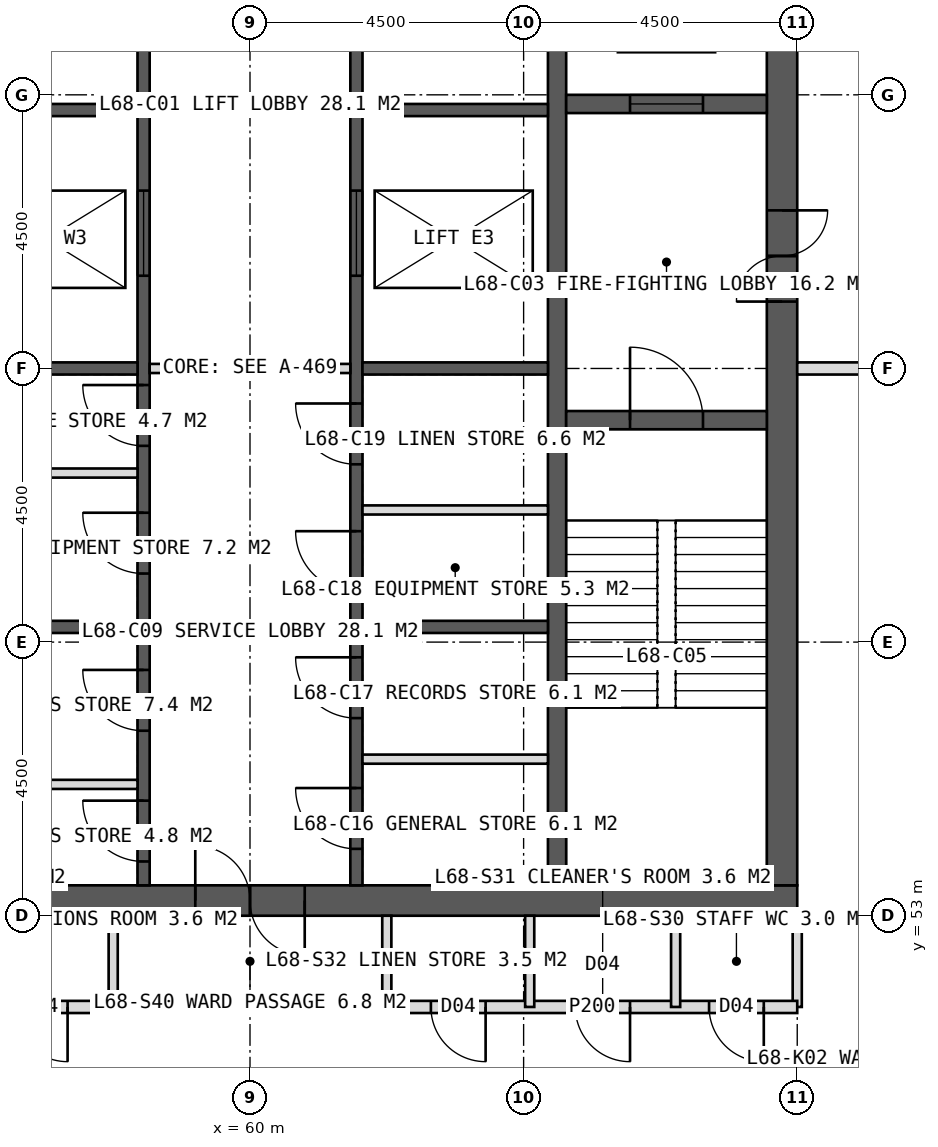
"""IFC4 building model, lengths in metres.
Left out: names, types, materials, properties, quantities, classifications, styles, units other than length and angle.
Written with IfcOpenShell. Run it as: python <this file> out.ifc"""

import sys

from ifc_helpers import new_model, si_unit, direction, frame, frame_2d, origin, place, context, subcontext, project, spatial, rectangle, extrude, element, fill, save


model = new_model("IFC4")
c1 = context("Model", 3, precision=1e-05, world=origin(), true_north=direction((0.0, 1.0)))
c2 = subcontext(c1, "Body", "Model", "MODEL_VIEW")
j1 = project(units=[si_unit("LENGTHUNIT", "METRE"), si_unit("PLANEANGLEUNIT", "RADIAN")], contexts=[c1])
p1 = place(None, origin())
s1 = spatial("IfcSite", under=j1, at=p1, CompositionType="ELEMENT")
p2 = place(p1, origin())
s2 = spatial("IfcBuilding", under=s1, at=p2, CompositionType="ELEMENT")
p3 = place(p2, frame((0.0, 0.0, 282.0)))
s3 = spatial("IfcBuildingStorey", under=s2, at=p3, CompositionType="ELEMENT", Elevation=282.0)
p4 = place(p3, frame((51.0, 53.25, 0.0), z_axis=(0.0, 0.0, 1.0), x_axis=(1.0, 0.0, 0.0)))
e1 = element("IfcWall", 1, at=p4, inside=s3, PredefinedType="SHEAR", context=c2, shape_type="SweptSolid", body=[
    extrude(rectangle(XDim=18.0, YDim=0.5, at=frame_2d((9.0, 0.0))), origin(), (0.0, 0.0, 1.0), 4.0),
])
p5 = place(p4, frame((8.1, 0.0, 0.0)))
e2 = element("IfcOpeningElement", 2, at=p5, cuts=e1, PredefinedType="OPENING", context=c2, shape_type="SweptSolid", body=[
    extrude(rectangle(XDim=1.8, YDim=2.2, at=frame_2d((0.9, 1.1))), frame((0.0, 0.26, 0.0), z_axis=(0.0, -1.0, 0.0), x_axis=(1.0, 0.0, 0.0)), (0.0, 0.0, 1.0), 0.52),
])
p6 = place(p3, frame((68.75, 53.5, 0.0), z_axis=(0.0, 0.0, 1.0), x_axis=(0.0, 1.0, 0.0)))
e3 = element("IfcWall", 3, at=p6, inside=s3, PredefinedType="SHEAR", context=c2, shape_type="SweptSolid", body=[
    extrude(rectangle(XDim=17.0, YDim=0.5, at=frame_2d((8.5, 0.0))), origin(), (0.0, 0.0, 1.0), 4.0),
])
p7 = place(p6, frame((9.6, 0.0, 0.0)))
e4 = element("IfcOpeningElement", 4, at=p7, cuts=e3, PredefinedType="OPENING", context=c2, shape_type="SweptSolid", body=[
    extrude(rectangle(XDim=1.5, YDim=2.2, at=frame_2d((0.75, 1.1))), frame((0.0, 0.26, 0.0), z_axis=(0.0, -1.0, 0.0), x_axis=(1.0, 0.0, 0.0)), (0.0, 0.0, 1.0), 0.52),
])
p8 = place(p3, frame((65.05, 53.5, 0.0), z_axis=(0.0, 0.0, 1.0), x_axis=(0.0, 1.0, 0.0)))
e5 = element("IfcWall", 5, at=p8, inside=s3, PredefinedType="SHEAR", context=c2, shape_type="SweptSolid", body=[
    extrude(rectangle(XDim=17.0, YDim=0.3, at=frame_2d((8.5, 0.0))), origin(), (0.0, 0.0, 1.0), 4.0),
])
p9 = place(p3, frame((58.25, 53.5, 0.0), z_axis=(0.0, 0.0, 1.0), x_axis=(0.0, 1.0, 0.0)))
e6 = element("IfcWall", 6, at=p9, inside=s3, PredefinedType="SHEAR", context=c2, shape_type="SweptSolid", body=[
    extrude(rectangle(XDim=17.0, YDim=0.2, at=frame_2d((8.5, 0.0))), origin(), (0.0, 0.0, 1.0), 4.0),
])
p10 = place(p9, frame((0.393, 0.0, 0.0)))
e7 = element("IfcOpeningElement", 7, at=p10, cuts=e6, PredefinedType="OPENING", context=c2, shape_type="SweptSolid", body=[
    extrude(rectangle(XDim=1.0, YDim=2.1, at=frame_2d((0.5, 1.05))), frame((0.0, 0.11, 0.0), z_axis=(0.0, -1.0, 0.0), x_axis=(1.0, 0.0, 0.0)), (0.0, 0.0, 1.0), 0.22),
])
p11 = place(p9, frame((2.542, 0.0, 0.0)))
e8 = element("IfcOpeningElement", 8, at=p11, cuts=e6, PredefinedType="OPENING", context=c2, shape_type="SweptSolid", body=[
    extrude(rectangle(XDim=1.0, YDim=2.1, at=frame_2d((0.5, 1.05))), frame((0.0, 0.11, 0.0), z_axis=(0.0, -1.0, 0.0), x_axis=(1.0, 0.0, 0.0)), (0.0, 0.0, 1.0), 0.22),
])
p12 = place(p9, frame((5.127, 0.0, 0.0)))
e9 = element("IfcOpeningElement", 9, at=p12, cuts=e6, PredefinedType="OPENING", context=c2, shape_type="SweptSolid", body=[
    extrude(rectangle(XDim=1.0, YDim=2.1, at=frame_2d((0.5, 1.05))), frame((0.0, 0.11, 0.0), z_axis=(0.0, -1.0, 0.0), x_axis=(1.0, 0.0, 0.0)), (0.0, 0.0, 1.0), 0.22),
])
p13 = place(p9, frame((7.228, 0.0, 0.0)))
e10 = element("IfcOpeningElement", 10, at=p13, cuts=e6, PredefinedType="OPENING", context=c2, shape_type="SweptSolid", body=[
    extrude(rectangle(XDim=1.0, YDim=2.1, at=frame_2d((0.5, 1.05))), frame((0.0, 0.11, 0.0), z_axis=(0.0, -1.0, 0.0), x_axis=(1.0, 0.0, 0.0)), (0.0, 0.0, 1.0), 0.22),
])
p14 = place(p9, frame((10.025, 0.0, 0.0)))
e11 = element("IfcOpeningElement", 11, at=p14, cuts=e6, PredefinedType="OPENING", context=c2, shape_type="SweptSolid", body=[
    extrude(rectangle(XDim=1.4, YDim=2.2, at=frame_2d((0.7, 1.1))), frame((0.0, 0.11, 0.0), z_axis=(0.0, -1.0, 0.0), x_axis=(1.0, 0.0, 0.0)), (0.0, 0.0, 1.0), 0.22),
])
p15 = place(p9, frame((14.325, 0.0, 0.0)))
e12 = element("IfcOpeningElement", 12, at=p15, cuts=e6, PredefinedType="OPENING", context=c2, shape_type="SweptSolid", body=[
    extrude(rectangle(XDim=1.4, YDim=2.2, at=frame_2d((0.7, 1.1))), frame((0.0, 0.11, 0.0), z_axis=(0.0, -1.0, 0.0), x_axis=(1.0, 0.0, 0.0)), (0.0, 0.0, 1.0), 0.22),
])
p16 = place(p3, frame((61.75, 53.5, 0.0), z_axis=(0.0, 0.0, 1.0), x_axis=(0.0, 1.0, 0.0)))
e13 = element("IfcWall", 13, at=p16, inside=s3, PredefinedType="SHEAR", context=c2, shape_type="SweptSolid", body=[
    extrude(rectangle(XDim=17.0, YDim=0.2, at=frame_2d((8.5, 0.0))), origin(), (0.0, 0.0, 1.0), 4.0),
])
p17 = place(p16, frame((0.6, 0.0, 0.0)))
e14 = element("IfcOpeningElement", 14, at=p17, cuts=e13, PredefinedType="OPENING", context=c2, shape_type="SweptSolid", body=[
    extrude(rectangle(XDim=1.0, YDim=2.1, at=frame_2d((0.5, 1.05))), frame((0.0, 0.11, 0.0), z_axis=(0.0, -1.0, 0.0), x_axis=(1.0, 0.0, 0.0)), (0.0, 0.0, 1.0), 0.22),
])
p18 = place(p16, frame((2.75, 0.0, 0.0)))
e15 = element("IfcOpeningElement", 15, at=p18, cuts=e13, PredefinedType="OPENING", context=c2, shape_type="SweptSolid", body=[
    extrude(rectangle(XDim=1.0, YDim=2.1, at=frame_2d((0.5, 1.05))), frame((0.0, 0.11, 0.0), z_axis=(0.0, -1.0, 0.0), x_axis=(1.0, 0.0, 0.0)), (0.0, 0.0, 1.0), 0.22),
])
p19 = place(p16, frame((4.824, 0.0, 0.0)))
e16 = element("IfcOpeningElement", 16, at=p19, cuts=e13, PredefinedType="OPENING", context=c2, shape_type="SweptSolid", body=[
    extrude(rectangle(XDim=1.0, YDim=2.1, at=frame_2d((0.5, 1.05))), frame((0.0, 0.11, 0.0), z_axis=(0.0, -1.0, 0.0), x_axis=(1.0, 0.0, 0.0)), (0.0, 0.0, 1.0), 0.22),
])
p20 = place(p16, frame((6.924, 0.0, 0.0)))
e17 = element("IfcOpeningElement", 17, at=p20, cuts=e13, PredefinedType="OPENING", context=c2, shape_type="SweptSolid", body=[
    extrude(rectangle(XDim=1.0, YDim=2.1, at=frame_2d((0.5, 1.05))), frame((0.0, 0.11, 0.0), z_axis=(0.0, -1.0, 0.0), x_axis=(1.0, 0.0, 0.0)), (0.0, 0.0, 1.0), 0.22),
])
p21 = place(p16, frame((10.025, 0.0, 0.0)))
e18 = element("IfcOpeningElement", 18, at=p21, cuts=e13, PredefinedType="OPENING", context=c2, shape_type="SweptSolid", body=[
    extrude(rectangle(XDim=1.4, YDim=2.2, at=frame_2d((0.7, 1.1))), frame((0.0, 0.11, 0.0), z_axis=(0.0, -1.0, 0.0), x_axis=(1.0, 0.0, 0.0)), (0.0, 0.0, 1.0), 0.22),
])
p22 = place(p16, frame((14.325, 0.0, 0.0)))
e19 = element("IfcOpeningElement", 19, at=p22, cuts=e13, PredefinedType="OPENING", context=c2, shape_type="SweptSolid", body=[
    extrude(rectangle(XDim=1.4, YDim=2.2, at=frame_2d((0.7, 1.1))), frame((0.0, 0.11, 0.0), z_axis=(0.0, -1.0, 0.0), x_axis=(1.0, 0.0, 0.0)), (0.0, 0.0, 1.0), 0.22),
])
for number, where, z_axis, x_axis in (
    (20, (55.1, 57.75, 0.0), (0.0, 0.0, 1.0), (1.0, 0.0, 0.0)),
    (21, (61.85, 57.75, 0.0), (0.0, 0.0, 1.0), (1.0, 0.0, 0.0)),
    (22, (55.1, 62.0, 0.0), (0.0, 0.0, 1.0), (1.0, 0.0, 0.0)),
    (23, (61.85, 62.0, 0.0), (0.0, 0.0, 1.0), (1.0, 0.0, 0.0)),
    (24, (55.1, 66.25, 0.0), (0.0, 0.0, 1.0), (1.0, 0.0, 0.0)),
    (25, (61.85, 66.25, 0.0), (0.0, 0.0, 1.0), (1.0, 0.0, 0.0)),
):
    element("IfcWall", number, at=place(p3, frame(where, z_axis=z_axis, x_axis=x_axis)), inside=s3, PredefinedType="SHEAR", context=c2, shape_type="SweptSolid", body=[
        extrude(rectangle(XDim=3.05, YDim=0.2, at=frame_2d((1.525, 0.0))), origin(), (0.0, 0.0, 1.0), 4.0),
    ])
p23 = place(p3, frame((65.2, 61.15, 0.0), z_axis=(0.0, 0.0, 1.0), x_axis=(1.0, 0.0, 0.0)))
e26 = element("IfcWall", 26, at=p23, inside=s3, PredefinedType="SHEAR", context=c2, shape_type="SweptSolid", body=[
    extrude(rectangle(XDim=3.3, YDim=0.3, at=frame_2d((1.65, 0.0))), origin(), (0.0, 0.0, 1.0), 4.0),
])
p24 = place(p23, frame((1.05, 0.0, 0.0)))
e27 = element("IfcOpeningElement", 27, at=p24, cuts=e26, PredefinedType="OPENING", context=c2, shape_type="SweptSolid", body=[
    extrude(rectangle(XDim=1.2, YDim=2.1, at=frame_2d((0.6, 1.05))), frame((0.0, 0.16, 0.0), z_axis=(0.0, -1.0, 0.0), x_axis=(1.0, 0.0, 0.0)), (0.0, 0.0, 1.0), 0.32),
])
p25 = place(p3, frame((65.2, 66.35, 0.0), z_axis=(0.0, 0.0, 1.0), x_axis=(1.0, 0.0, 0.0)))
e28 = element("IfcWall", 28, at=p25, inside=s3, PredefinedType="SHEAR", context=c2, shape_type="SweptSolid", body=[
    extrude(rectangle(XDim=3.3, YDim=0.3, at=frame_2d((1.65, 0.0))), origin(), (0.0, 0.0, 1.0), 4.0),
])
p26 = place(p25, frame((1.05, 0.0, 0.0)))
e29 = element("IfcOpeningElement", 29, at=p26, cuts=e28, PredefinedType="OPENING", context=c2, shape_type="SweptSolid", body=[
    extrude(rectangle(XDim=1.2, YDim=2.2, at=frame_2d((0.6, 1.1))), frame((0.0, 0.16, 0.0), z_axis=(0.0, -1.0, 0.0), x_axis=(1.0, 0.0, 0.0)), (0.0, 0.0, 1.0), 0.32),
])
p27 = place(p3, frame((69.0, 53.0, 0.0), z_axis=(0.0, 0.0, 1.0), x_axis=(0.0, -1.0, 0.0)))
e30 = element("IfcWall", 30, at=p27, inside=s3, PredefinedType="PARTITIONING", context=c2, shape_type="SweptSolid", body=[
    extrude(rectangle(XDim=1.5, YDim=0.15, at=frame_2d((0.75, 0.0))), origin(), (0.0, 0.0, 1.0), 3.75),
])
p28 = place(p3, frame((69.0, 51.5, 0.0), z_axis=(0.0, 0.0, 1.0), x_axis=(-1.0, 0.0, 0.0)))
e31 = element("IfcWall", 31, at=p28, inside=s3, PredefinedType="PARTITIONING", context=c2, shape_type="SweptSolid", body=[
    extrude(rectangle(XDim=6.75, YDim=0.2, at=frame_2d((3.375, 0.0))), origin(), (0.0, 0.0, 1.0), 3.75),
])
p29 = place(p28, frame((0.55, 0.0, 0.0)))
e32 = element("IfcOpeningElement", 32, at=p29, cuts=e31, PredefinedType="OPENING", context=c2, shape_type="SweptSolid", body=[
    extrude(rectangle(XDim=0.9, YDim=2.1, at=frame_2d((0.45, 1.05))), frame((0.0, 0.11, 0.0), z_axis=(0.0, -1.0, 0.0), x_axis=(1.0, 0.0, 0.0)), (0.0, 0.0, 1.0), 0.22),
])
p30 = place(p28, frame((2.75, 0.0, 0.0)))
e33 = element("IfcOpeningElement", 33, at=p30, cuts=e31, PredefinedType="OPENING", context=c2, shape_type="SweptSolid", body=[
    extrude(rectangle(XDim=0.9, YDim=2.1, at=frame_2d((0.45, 1.05))), frame((0.0, 0.11, 0.0), z_axis=(0.0, -1.0, 0.0), x_axis=(1.0, 0.0, 0.0)), (0.0, 0.0, 1.0), 0.22),
])
p31 = place(p28, frame((5.125, 0.0, 0.0)))
e34 = element("IfcOpeningElement", 34, at=p31, cuts=e31, PredefinedType="OPENING", context=c2, shape_type="SweptSolid", body=[
    extrude(rectangle(XDim=0.9, YDim=2.1, at=frame_2d((0.45, 1.05))), frame((0.0, 0.11, 0.0), z_axis=(0.0, -1.0, 0.0), x_axis=(1.0, 0.0, 0.0)), (0.0, 0.0, 1.0), 0.22),
])
p32 = place(p3, frame((57.75, 51.5, 0.0), z_axis=(0.0, 0.0, 1.0), x_axis=(-1.0, 0.0, 0.0)))
e35 = element("IfcWall", 35, at=p32, inside=s3, PredefinedType="PARTITIONING", context=c2, shape_type="SweptSolid", body=[
    extrude(rectangle(XDim=8.25, YDim=0.2, at=frame_2d((4.125, 0.0))), origin(), (0.0, 0.0, 1.0), 3.75),
])
p33 = place(p32, frame((0.75, 0.0, 0.0)))
e36 = element("IfcOpeningElement", 36, at=p33, cuts=e35, PredefinedType="OPENING", context=c2, shape_type="SweptSolid", body=[
    extrude(rectangle(XDim=0.9, YDim=2.1, at=frame_2d((0.45, 1.05))), frame((0.0, 0.11, 0.0), z_axis=(0.0, -1.0, 0.0), x_axis=(1.0, 0.0, 0.0)), (0.0, 0.0, 1.0), 0.22),
])
p34 = place(p32, frame((3.2, 0.0, 0.0)))
e37 = element("IfcOpeningElement", 37, at=p34, cuts=e35, PredefinedType="OPENING", context=c2, shape_type="SweptSolid", body=[
    extrude(rectangle(XDim=0.9, YDim=2.1, at=frame_2d((0.45, 1.05))), frame((0.0, 0.11, 0.0), z_axis=(0.0, -1.0, 0.0), x_axis=(1.0, 0.0, 0.0)), (0.0, 0.0, 1.0), 0.22),
])
p35 = place(p32, frame((6.075, 0.0, 0.0)))
e38 = element("IfcOpeningElement", 38, at=p35, cuts=e35, PredefinedType="OPENING", context=c2, shape_type="SweptSolid", body=[
    extrude(rectangle(XDim=1.0, YDim=2.1, at=frame_2d((0.5, 1.05))), frame((0.0, 0.11, 0.0), z_axis=(0.0, -1.0, 0.0), x_axis=(1.0, 0.0, 0.0)), (0.0, 0.0, 1.0), 0.22),
])
for number, where, z_axis, x_axis in (
    (39, (62.25, 53.0, 0.0), (0.0, 0.0, 1.0), (0.0, -1.0, 0.0)),
    (40, (57.75, 53.0, 0.0), (0.0, 0.0, 1.0), (0.0, -1.0, 0.0)),
    (41, (67.0, 53.0, 0.0), (0.0, 0.0, 1.0), (0.0, -1.0, 0.0)),
):
    element("IfcWall", number, at=place(p3, frame(where, z_axis=z_axis, x_axis=x_axis)), inside=s3, PredefinedType="PARTITIONING", context=c2, shape_type="SweptSolid", body=[
        extrude(rectangle(XDim=1.5, YDim=0.15, at=frame_2d((0.75, 0.0))), origin(), (0.0, 0.0, 1.0), 3.75),
    ])
p36 = place(p3, frame((64.6, 53.0, 0.0), z_axis=(0.0, 0.0, 1.0), x_axis=(0.0, -1.0, 0.0)))
e42 = element("IfcWall", 42, at=p36, inside=s3, PredefinedType="PARTITIONING", context=c2, shape_type="SweptSolid", body=[
    extrude(rectangle(XDim=1.5, YDim=0.15, at=frame_2d((0.75, 0.0))), origin(), (0.0, 0.0, 1.0), 2.95),
])
p37 = place(p3, frame((69.0, 62.0, 0.0), z_axis=(0.0, 0.0, 1.0), x_axis=(1.0, 0.0, 0.0)))
e43 = element("IfcWall", 43, at=p37, inside=s3, PredefinedType="SOLIDWALL", context=c2, shape_type="SweptSolid", body=[
    extrude(rectangle(XDim=1.5, YDim=0.2, at=frame_2d((0.75, 0.0))), origin(), (0.0, 0.0, 1.0), 2.75),
])
for number, where, z_axis, x_axis in (
    (44, (55.1, 55.16, 0.0), (0.0, 0.0, 1.0), (1.0, 0.0, 0.0)),
    (45, (61.85, 55.575, 0.0), (0.0, 0.0, 1.0), (1.0, 0.0, 0.0)),
    (46, (55.1, 60.28, 0.0), (0.0, 0.0, 1.0), (1.0, 0.0, 0.0)),
    (47, (61.85, 59.673, 0.0), (0.0, 0.0, 1.0), (1.0, 0.0, 0.0)),
):
    element("IfcWall", number, at=place(p3, frame(where, z_axis=z_axis, x_axis=x_axis)), inside=s3, PredefinedType="PARTITIONING", context=c2, shape_type="SweptSolid", body=[
        extrude(rectangle(XDim=3.05, YDim=0.15, at=frame_2d((1.525, 0.0))), origin(), (0.0, 0.0, 1.0), 3.75),
    ])
p38 = place(p3, frame((58.35, 62.0, 0.0), z_axis=(0.0, 0.0, 1.0), x_axis=(1.0, 0.0, 0.0)))
e48 = element("IfcWall", 48, at=p38, inside=s3, PredefinedType="PARTITIONING", context=c2, shape_type="SweptSolid", body=[
    extrude(rectangle(XDim=3.3, YDim=0.15, at=frame_2d((1.65, 0.0))), origin(), (0.0, 0.0, 1.0), 3.75),
])
p39 = place(p29, origin())
e49 = element("IfcDoor", 49, at=p39, inside=s3, OperationType="SINGLE_SWING_LEFT", PredefinedType="DOOR", context=c2, shape_type="SweptSolid", body=[
    extrude(rectangle(XDim=0.9, YDim=2.1, at=frame_2d((0.45, 1.05))), frame((0.0, 0.025, 0.0), z_axis=(0.0, -1.0, 0.0), x_axis=(1.0, 0.0, 0.0)), (0.0, 0.0, 1.0), 0.05),
])
fill(e32, e49)
p40 = place(p30, origin())
e50 = element("IfcDoor", 50, at=p40, inside=s3, OperationType="SINGLE_SWING_LEFT", PredefinedType="DOOR", context=c2, shape_type="SweptSolid", body=[
    extrude(rectangle(XDim=0.9, YDim=2.1, at=frame_2d((0.45, 1.05))), frame((0.0, 0.025, 0.0), z_axis=(0.0, -1.0, 0.0), x_axis=(1.0, 0.0, 0.0)), (0.0, 0.0, 1.0), 0.05),
])
fill(e33, e50)
p41 = place(p31, origin())
e51 = element("IfcDoor", 51, at=p41, inside=s3, OperationType="SINGLE_SWING_LEFT", PredefinedType="DOOR", context=c2, shape_type="SweptSolid", body=[
    extrude(rectangle(XDim=0.9, YDim=2.1, at=frame_2d((0.45, 1.05))), frame((0.0, 0.025, 0.0), z_axis=(0.0, -1.0, 0.0), x_axis=(1.0, 0.0, 0.0)), (0.0, 0.0, 1.0), 0.05),
])
fill(e34, e51)
p42 = place(p33, origin())
e52 = element("IfcDoor", 52, at=p42, inside=s3, OperationType="SINGLE_SWING_LEFT", PredefinedType="DOOR", context=c2, shape_type="SweptSolid", body=[
    extrude(rectangle(XDim=0.9, YDim=2.1, at=frame_2d((0.45, 1.05))), frame((0.0, 0.025, 0.0), z_axis=(0.0, -1.0, 0.0), x_axis=(1.0, 0.0, 0.0)), (0.0, 0.0, 1.0), 0.05),
])
fill(e36, e52)
p43 = place(p7, origin())
e53 = element("IfcDoor", 53, at=p43, inside=s3, OperationType="DOUBLE_DOOR_SINGLE_SWING", PredefinedType="DOOR", context=c2, shape_type="SweptSolid", body=[
    extrude(rectangle(XDim=1.5, YDim=2.2, at=frame_2d((0.75, 1.1))), frame((0.0, 0.025, 0.0), z_axis=(0.0, -1.0, 0.0), x_axis=(1.0, 0.0, 0.0)), (0.0, 0.0, 1.0), 0.05),
])
fill(e4, e53)
p44 = place(p24, origin())
e54 = element("IfcDoor", 54, at=p44, inside=s3, OperationType="SINGLE_SWING_LEFT", PredefinedType="DOOR", context=c2, shape_type="SweptSolid", body=[
    extrude(rectangle(XDim=1.2, YDim=2.1, at=frame_2d((0.6, 1.05))), frame((0.0, 0.025, 0.0), z_axis=(0.0, -1.0, 0.0), x_axis=(1.0, 0.0, 0.0)), (0.0, 0.0, 1.0), 0.05),
])
fill(e27, e54)
p45 = place(p26, origin())
e55 = element("IfcDoor", 55, at=p45, inside=s3, OperationType="SLIDING_TO_LEFT", PredefinedType="DOOR", context=c2, shape_type="SweptSolid", body=[
    extrude(rectangle(XDim=1.2, YDim=2.2, at=frame_2d((0.6, 1.1))), frame((0.0, 0.025, 0.0), z_axis=(0.0, -1.0, 0.0), x_axis=(1.0, 0.0, 0.0)), (0.0, 0.0, 1.0), 0.05),
])
fill(e29, e55)
p46 = place(p10, origin())
e56 = element("IfcDoor", 56, at=p46, inside=s3, OperationType="SINGLE_SWING_RIGHT", PredefinedType="DOOR", context=c2, shape_type="SweptSolid", body=[
    extrude(rectangle(XDim=1.0, YDim=2.1, at=frame_2d((0.5, 1.05))), frame((0.0, 0.025, 0.0), z_axis=(0.0, -1.0, 0.0), x_axis=(1.0, 0.0, 0.0)), (0.0, 0.0, 1.0), 0.05),
])
fill(e7, e56)
p47 = place(p11, origin())
e57 = element("IfcDoor", 57, at=p47, inside=s3, OperationType="SINGLE_SWING_RIGHT", PredefinedType="DOOR", context=c2, shape_type="SweptSolid", body=[
    extrude(rectangle(XDim=1.0, YDim=2.1, at=frame_2d((0.5, 1.05))), frame((0.0, 0.025, 0.0), z_axis=(0.0, -1.0, 0.0), x_axis=(1.0, 0.0, 0.0)), (0.0, 0.0, 1.0), 0.05),
])
fill(e8, e57)
p48 = place(p17, origin())
e58 = element("IfcDoor", 58, at=p48, inside=s3, OperationType="SINGLE_SWING_RIGHT", PredefinedType="DOOR", context=c2, shape_type="SweptSolid", body=[
    extrude(rectangle(XDim=1.0, YDim=2.1, at=frame_2d((0.5, 1.05))), frame((0.0, 0.025, 0.0), z_axis=(0.0, -1.0, 0.0), x_axis=(1.0, 0.0, 0.0)), (0.0, 0.0, 1.0), 0.05),
])
fill(e14, e58)
p49 = place(p18, origin())
e59 = element("IfcDoor", 59, at=p49, inside=s3, OperationType="SINGLE_SWING_RIGHT", PredefinedType="DOOR", context=c2, shape_type="SweptSolid", body=[
    extrude(rectangle(XDim=1.0, YDim=2.1, at=frame_2d((0.5, 1.05))), frame((0.0, 0.025, 0.0), z_axis=(0.0, -1.0, 0.0), x_axis=(1.0, 0.0, 0.0)), (0.0, 0.0, 1.0), 0.05),
])
fill(e15, e59)
p50 = place(p12, origin())
e60 = element("IfcDoor", 60, at=p50, inside=s3, OperationType="SINGLE_SWING_RIGHT", PredefinedType="DOOR", context=c2, shape_type="SweptSolid", body=[
    extrude(rectangle(XDim=1.0, YDim=2.1, at=frame_2d((0.5, 1.05))), frame((0.0, 0.025, 0.0), z_axis=(0.0, -1.0, 0.0), x_axis=(1.0, 0.0, 0.0)), (0.0, 0.0, 1.0), 0.05),
])
fill(e9, e60)
p51 = place(p13, origin())
e61 = element("IfcDoor", 61, at=p51, inside=s3, OperationType="SINGLE_SWING_RIGHT", PredefinedType="DOOR", context=c2, shape_type="SweptSolid", body=[
    extrude(rectangle(XDim=1.0, YDim=2.1, at=frame_2d((0.5, 1.05))), frame((0.0, 0.025, 0.0), z_axis=(0.0, -1.0, 0.0), x_axis=(1.0, 0.0, 0.0)), (0.0, 0.0, 1.0), 0.05),
])
fill(e10, e61)
p52 = place(p19, origin())
e62 = element("IfcDoor", 62, at=p52, inside=s3, OperationType="SINGLE_SWING_RIGHT", PredefinedType="DOOR", context=c2, shape_type="SweptSolid", body=[
    extrude(rectangle(XDim=1.0, YDim=2.1, at=frame_2d((0.5, 1.05))), frame((0.0, 0.025, 0.0), z_axis=(0.0, -1.0, 0.0), x_axis=(1.0, 0.0, 0.0)), (0.0, 0.0, 1.0), 0.05),
])
fill(e16, e62)
p53 = place(p20, origin())
e63 = element("IfcDoor", 63, at=p53, inside=s3, OperationType="SINGLE_SWING_RIGHT", PredefinedType="DOOR", context=c2, shape_type="SweptSolid", body=[
    extrude(rectangle(XDim=1.0, YDim=2.1, at=frame_2d((0.5, 1.05))), frame((0.0, 0.025, 0.0), z_axis=(0.0, -1.0, 0.0), x_axis=(1.0, 0.0, 0.0)), (0.0, 0.0, 1.0), 0.05),
])
fill(e17, e63)
p54 = place(p14, origin())
e64 = element("IfcDoor", 64, at=p54, inside=s3, OperationType="SLIDING_TO_LEFT", PredefinedType="DOOR", context=c2, shape_type="SweptSolid", body=[
    extrude(rectangle(XDim=1.4, YDim=2.2, at=frame_2d((0.7, 1.1))), frame((0.0, 0.025, 0.0), z_axis=(0.0, -1.0, 0.0), x_axis=(1.0, 0.0, 0.0)), (0.0, 0.0, 1.0), 0.05),
])
fill(e11, e64)
p55 = place(p21, origin())
e65 = element("IfcDoor", 65, at=p55, inside=s3, OperationType="SLIDING_TO_LEFT", PredefinedType="DOOR", context=c2, shape_type="SweptSolid", body=[
    extrude(rectangle(XDim=1.4, YDim=2.2, at=frame_2d((0.7, 1.1))), frame((0.0, 0.025, 0.0), z_axis=(0.0, -1.0, 0.0), x_axis=(1.0, 0.0, 0.0)), (0.0, 0.0, 1.0), 0.05),
])
fill(e18, e65)
p56 = place(p5, origin())
e66 = element("IfcDoor", 66, at=p56, inside=s3, OperationType="DOUBLE_DOOR_SINGLE_SWING", PredefinedType="DOOR", context=c2, shape_type="SweptSolid", body=[
    extrude(rectangle(XDim=1.8, YDim=2.2, at=frame_2d((0.9, 1.1))), frame((0.0, 0.025, 0.0), z_axis=(0.0, -1.0, 0.0), x_axis=(1.0, 0.0, 0.0)), (0.0, 0.0, 1.0), 0.05),
])
fill(e2, e66)
save(model, sys.argv[1])
